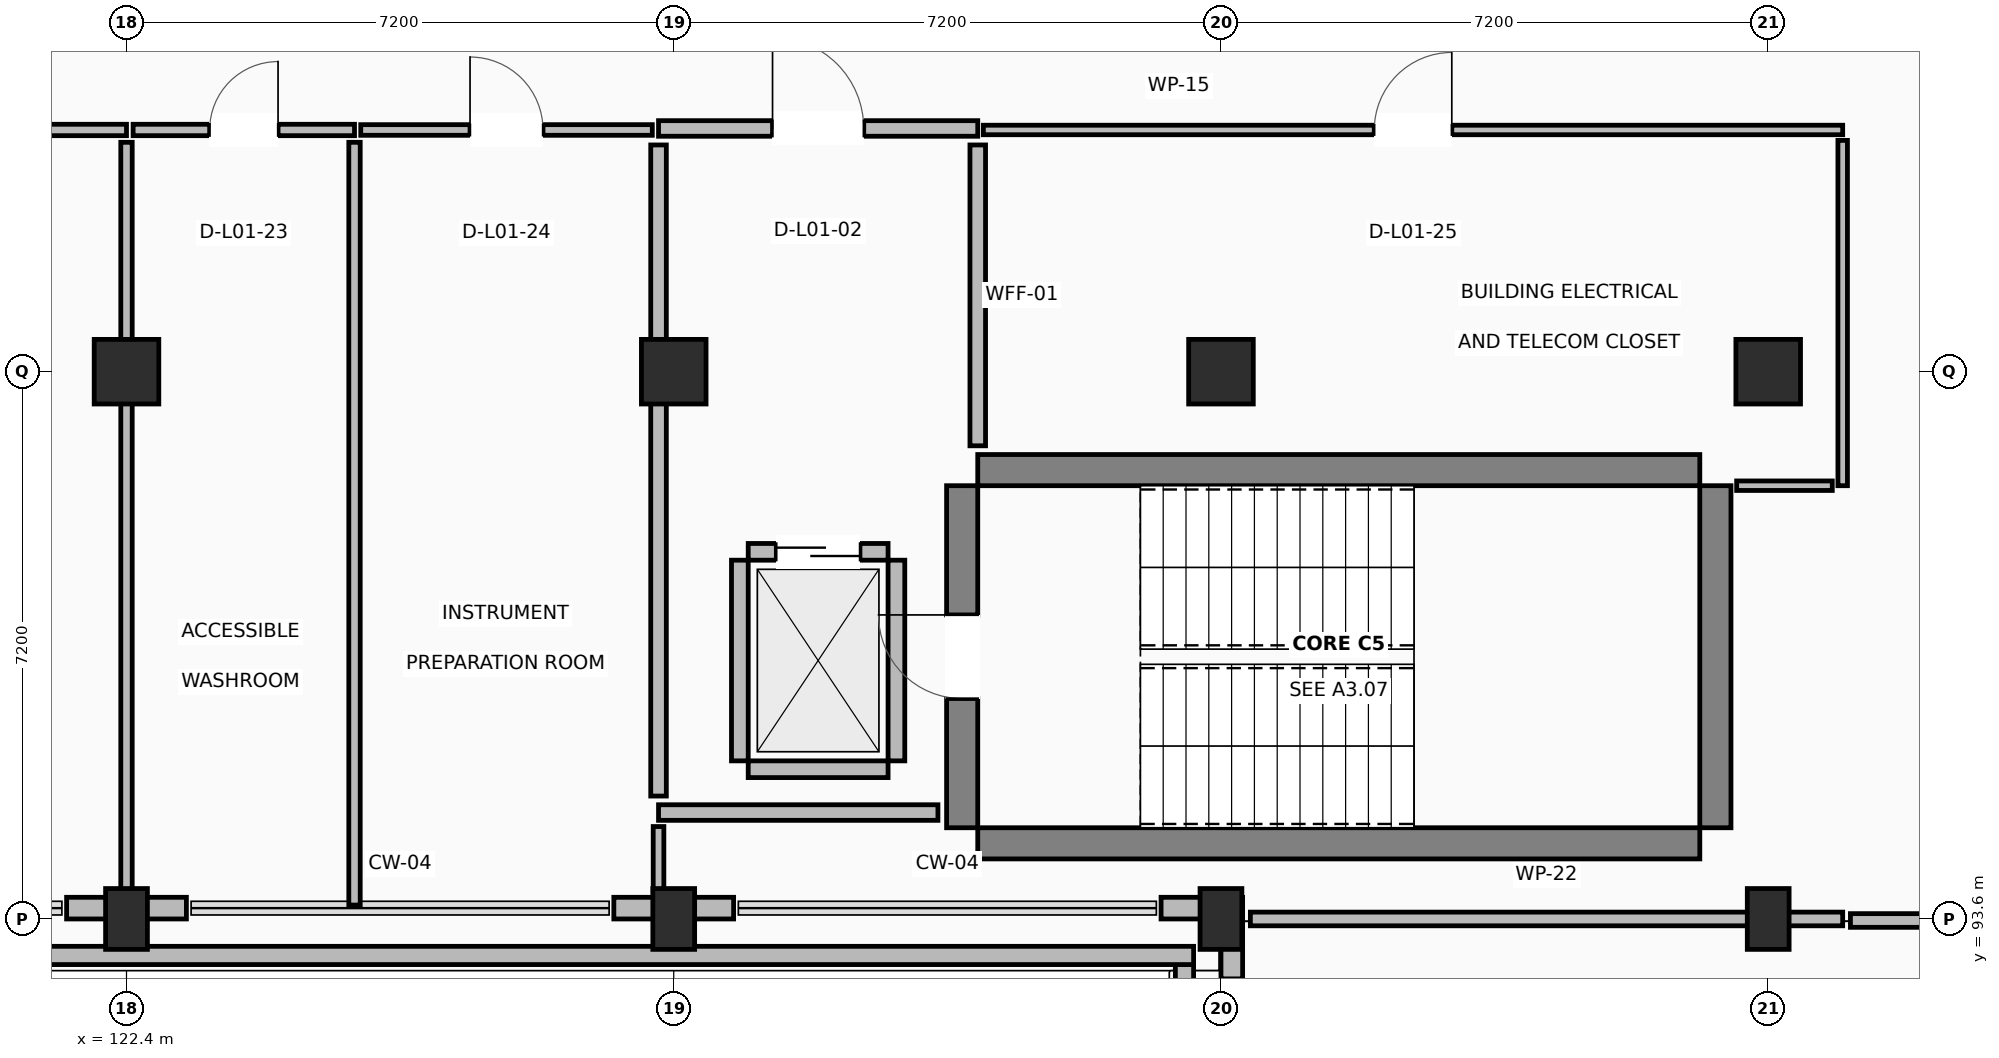
"""IFC4 building model, lengths in metres.
Left out: names, types, materials, properties, quantities, classifications, styles, units other than length and angle.
Written with IfcOpenShell. Run it as: python <this file> out.ifc"""

import sys

from ifc_helpers import new_model, si_unit, direction, frame, frame_2d, origin, origin_2d, place, context, subcontext, project, spatial, rectangle, extrude, element, fill, save


model = new_model("IFC4")
c1 = context("Model", 3, precision=1e-05, world=origin(), true_north=direction((0.0, 1.0)))
c2 = subcontext(c1, "Body", "Model", "MODEL_VIEW")
j1 = project(units=[si_unit("LENGTHUNIT", "METRE"), si_unit("PLANEANGLEUNIT", "RADIAN")], contexts=[c1])
p1 = place(None, origin())
s1 = spatial("IfcSite", under=j1, at=p1, CompositionType="ELEMENT")
p2 = place(p1, origin())
s2 = spatial("IfcBuilding", under=s1, at=p2, CompositionType="ELEMENT")
p3 = place(p2, frame((0.0, 0.0, 4.5)))
s3 = spatial("IfcBuildingStorey", under=s2, at=p3, CompositionType="ELEMENT", Elevation=4.5)
p4 = place(p3, frame((122.4, 93.6, 0.0), z_axis=(0.0, 0.0, 1.0), x_axis=(1.0, 0.0, 0.0)))
e1 = element("IfcColumn", 1, at=p4, inside=s3, PredefinedType="COLUMN", context=c2, shape_type="SweptSolid", body=[
    extrude(rectangle(XDim=0.55, YDim=0.8, at=origin_2d()), origin(), (0.0, 0.0, 1.0), 4.22),
])
p5 = place(p3, frame((122.4, 100.8, 0.0), z_axis=(0.0, 0.0, 1.0), x_axis=(1.0, 0.0, 0.0)))
e2 = element("IfcColumn", 2, at=p5, inside=s3, PredefinedType="COLUMN", context=c2, shape_type="SweptSolid", body=[
    extrude(rectangle(XDim=0.85, YDim=0.85, at=origin_2d()), origin(), (0.0, 0.0, 1.0), 4.22),
])
p6 = place(p3, frame((129.6, 93.6, 0.0), z_axis=(0.0, 0.0, 1.0), x_axis=(1.0, 0.0, 0.0)))
e3 = element("IfcColumn", 3, at=p6, inside=s3, PredefinedType="COLUMN", context=c2, shape_type="SweptSolid", body=[
    extrude(rectangle(XDim=0.55, YDim=0.8, at=origin_2d()), origin(), (0.0, 0.0, 1.0), 4.22),
])
p7 = place(p3, frame((129.6, 100.8, 0.0), z_axis=(0.0, 0.0, 1.0), x_axis=(1.0, 0.0, 0.0)))
e4 = element("IfcColumn", 4, at=p7, inside=s3, PredefinedType="COLUMN", context=c2, shape_type="SweptSolid", body=[
    extrude(rectangle(XDim=0.85, YDim=0.85, at=origin_2d()), origin(), (0.0, 0.0, 1.0), 4.22),
])
p8 = place(p3, frame((136.8, 93.6, 0.0), z_axis=(0.0, 0.0, 1.0), x_axis=(1.0, 0.0, 0.0)))
e5 = element("IfcColumn", 5, at=p8, inside=s3, PredefinedType="COLUMN", context=c2, shape_type="SweptSolid", body=[
    extrude(rectangle(XDim=0.55, YDim=0.8, at=origin_2d()), origin(), (0.0, 0.0, 1.0), 4.22),
])
p9 = place(p3, frame((136.8, 100.8, 0.0), z_axis=(0.0, 0.0, 1.0), x_axis=(1.0, 0.0, 0.0)))
e6 = element("IfcColumn", 6, at=p9, inside=s3, PredefinedType="COLUMN", context=c2, shape_type="SweptSolid", body=[
    extrude(rectangle(XDim=0.85, YDim=0.85, at=origin_2d()), origin(), (0.0, 0.0, 1.0), 4.22),
])
p10 = place(p3, frame((144.0, 93.6, 0.0), z_axis=(0.0, 0.0, 1.0), x_axis=(1.0, 0.0, 0.0)))
e7 = element("IfcColumn", 7, at=p10, inside=s3, PredefinedType="COLUMN", context=c2, shape_type="SweptSolid", body=[
    extrude(rectangle(XDim=0.55, YDim=0.8, at=origin_2d()), origin(), (0.0, 0.0, 1.0), 4.22),
])
p11 = place(p3, frame((144.0, 100.8, 0.0), z_axis=(0.0, 0.0, 1.0), x_axis=(1.0, 0.0, 0.0)))
e8 = element("IfcColumn", 8, at=p11, inside=s3, PredefinedType="COLUMN", context=c2, shape_type="SweptSolid", body=[
    extrude(rectangle(XDim=0.85, YDim=0.85, at=origin_2d()), origin(), (0.0, 0.0, 1.0), 4.22),
])
for number, where, z_axis, x_axis in (
    (9, (133.6, 94.595, 0.0), (0.0, 0.0, 1.0), (1.0, 0.0, 0.0)),
    (10, (133.6, 99.505, 0.0), (0.0, 0.0, 1.0), (1.0, 0.0, 0.0)),
):
    element("IfcWall", number, at=place(p3, frame(where, z_axis=z_axis, x_axis=x_axis)), inside=s3, PredefinedType="SHEAR", context=c2, shape_type="SweptSolid", body=[
        extrude(rectangle(XDim=9.5, YDim=0.41, at=frame_2d((4.75, 0.0))), origin(), (0.0, 0.0, 1.0), 4.22),
    ])
p12 = place(p3, frame((133.395, 94.8, 0.0), z_axis=(0.0, 0.0, 1.0), x_axis=(0.0, 1.0, 0.0)))
e11 = element("IfcWall", 11, at=p12, inside=s3, PredefinedType="SHEAR", context=c2, shape_type="SweptSolid", body=[
    extrude(rectangle(XDim=4.5, YDim=0.41, at=frame_2d((2.25, 0.0))), origin(), (0.0, 0.0, 1.0), 4.22),
])
p13 = place(p12, frame((1.7, 0.0, 0.0)))
e12 = element("IfcOpeningElement", 12, at=p13, cuts=e11, PredefinedType="OPENING", context=c2, shape_type="SweptSolid", body=[
    extrude(rectangle(XDim=1.1, YDim=2.15, at=frame_2d((0.55, 1.075))), frame((0.0, 0.215, 0.0), z_axis=(0.0, -1.0, 0.0), x_axis=(1.0, 0.0, 0.0)), (0.0, 0.0, 1.0), 0.43),
])
p14 = place(p3, frame((143.305, 94.8, 0.0), z_axis=(0.0, 0.0, 1.0), x_axis=(0.0, 1.0, 0.0)))
e13 = element("IfcWall", 13, at=p14, inside=s3, PredefinedType="SHEAR", context=c2, shape_type="SweptSolid", body=[
    extrude(rectangle(XDim=4.5, YDim=0.41, at=frame_2d((2.25, 0.0))), origin(), (0.0, 0.0, 1.0), 4.22),
])
for number, where, z_axis, x_axis in (
    (14, (121.612, 93.742, 0.0), (0.0, 0.0, 1.0), (1.0, 0.0, 0.0)),
    (15, (128.812, 93.742, 0.0), (0.0, 0.0, 1.0), (1.0, 0.0, 0.0)),
):
    element("IfcWall", number, at=place(p3, frame(where, z_axis=z_axis, x_axis=x_axis)), inside=s3, PredefinedType="STANDARD", context=c2, shape_type="SweptSolid", body=[
        extrude(rectangle(XDim=1.576, YDim=0.285, at=frame_2d((0.788, 0.0))), origin(), (0.0, 0.0, 1.0), 3.26),
    ])
p15 = place(p3, frame((136.012, 93.742, 0.0), z_axis=(0.0, 0.0, 1.0), x_axis=(1.0, 0.0, 0.0)))
e16 = element("IfcWall", 16, at=p15, inside=s3, PredefinedType="STANDARD", context=c2, shape_type="SweptSolid", body=[
    extrude(rectangle(XDim=0.788, YDim=0.285, at=frame_2d((0.394, 0.0))), origin(), (0.0, 0.0, 1.0), 3.26),
])
p16 = place(p3, frame((136.942, 93.885, 0.0), z_axis=(0.0, 0.0, 1.0), x_axis=(0.0, -1.0, 0.0)))
e17 = element("IfcWall", 17, at=p16, inside=s3, PredefinedType="STANDARD", context=c2, shape_type="SweptSolid", body=[
    extrude(rectangle(XDim=1.073, YDim=0.285, at=frame_2d((0.537, 0.0))), origin(), (0.0, 0.0, 1.0), 3.26),
])
p17 = place(p3, frame((136.32, 86.04, 0.0), z_axis=(0.0, 0.0, 1.0), x_axis=(0.0, 1.0, 0.0)))
e18 = element("IfcWall", 18, at=p17, inside=s3, PredefinedType="PARAPET", context=c2, shape_type="SweptSolid", body=[
    extrude(rectangle(XDim=6.96, YDim=0.24, at=frame_2d((3.48, 0.0))), origin(), (0.0, 0.0, 1.0), 1.12),
])
p18 = place(p3, frame((136.44, 93.12, 0.0), z_axis=(0.0, 0.0, 1.0), x_axis=(-1.0, 0.0, 0.0)))
e19 = element("IfcWall", 19, at=p18, inside=s3, PredefinedType="PARAPET", context=c2, shape_type="SweptSolid", body=[
    extrude(rectangle(XDim=57.84, YDim=0.24, at=frame_2d((28.92, 0.0))), origin(), (0.0, 0.0, 1.0), 1.12),
])
p19 = place(p3, frame((130.58, 95.57, 0.0), z_axis=(0.0, 0.0, 1.0), x_axis=(1.0, 0.0, 0.0)))
e20 = element("IfcWall", 20, at=p19, inside=s3, PredefinedType="STANDARD", context=c2, shape_type="SweptSolid", body=[
    extrude(rectangle(XDim=1.84, YDim=0.22, at=frame_2d((0.92, 0.0))), origin(), (0.0, 0.0, 1.0), 3.26),
])
p20 = place(p3, frame((130.58, 98.43, 0.0), z_axis=(0.0, 0.0, 1.0), x_axis=(1.0, 0.0, 0.0)))
e21 = element("IfcWall", 21, at=p20, inside=s3, PredefinedType="STANDARD", context=c2, shape_type="SweptSolid", body=[
    extrude(rectangle(XDim=1.84, YDim=0.22, at=frame_2d((0.92, 0.0))), origin(), (0.0, 0.0, 1.0), 3.26),
])
p21 = place(p20, frame((0.37, 0.0, 0.0)))
e22 = element("IfcOpeningElement", 22, at=p21, cuts=e21, PredefinedType="OPENING", context=c2, shape_type="SweptSolid", body=[
    extrude(rectangle(XDim=1.1, YDim=2.15, at=frame_2d((0.55, 1.075))), frame((0.0, 0.12, 0.0), z_axis=(0.0, -1.0, 0.0), x_axis=(1.0, 0.0, 0.0)), (0.0, 0.0, 1.0), 0.24),
])
for number, where, z_axis, x_axis in (
    (23, (130.47, 95.68, 0.0), (0.0, 0.0, 1.0), (0.0, 1.0, 0.0)),
    (24, (132.53, 95.68, 0.0), (0.0, 0.0, 1.0), (0.0, 1.0, 0.0)),
):
    element("IfcWall", number, at=place(p3, frame(where, z_axis=z_axis, x_axis=x_axis)), inside=s3, PredefinedType="STANDARD", context=c2, shape_type="SweptSolid", body=[
        extrude(rectangle(XDim=2.64, YDim=0.22, at=frame_2d((1.32, 0.0))), origin(), (0.0, 0.0, 1.0), 3.26),
    ])
p22 = place(p3, frame((129.4, 104.0, 0.0), z_axis=(0.0, 0.0, 1.0), x_axis=(1.0, 0.0, 0.0)))
e25 = element("IfcWall", 25, at=p22, inside=s3, PredefinedType="PARTITIONING", context=c2, shape_type="SweptSolid", body=[
    extrude(rectangle(XDim=4.2, YDim=0.205, at=frame_2d((2.1, 0.0))), origin(), (0.0, 0.0, 1.0), 3.26),
])
p23 = place(p22, frame((1.5, 0.0, 0.0)))
e26 = element("IfcOpeningElement", 26, at=p23, cuts=e25, PredefinedType="OPENING", context=c2, shape_type="SweptSolid", body=[
    extrude(rectangle(XDim=1.2, YDim=2.15, at=frame_2d((0.6, 1.075))), frame((0.0, 0.113, 0.0), z_axis=(0.0, -1.0, 0.0), x_axis=(1.0, 0.0, 0.0)), (0.0, 0.0, 1.0), 0.225),
])
p24 = place(p3, frame((133.6, 103.783, 0.0), z_axis=(0.0, 0.0, 1.0), x_axis=(0.0, -1.0, 0.0)))
e27 = element("IfcWall", 27, at=p24, inside=s3, PredefinedType="PARTITIONING", context=c2, shape_type="SweptSolid", body=[
    extrude(rectangle(XDim=3.958, YDim=0.205, at=frame_2d((1.979, 0.0))), origin(), (0.0, 0.0, 1.0), 3.26),
])
p25 = place(p3, frame((133.076, 95.0, 0.0), z_axis=(0.0, 0.0, 1.0), x_axis=(-1.0, 0.0, 0.0)))
e28 = element("IfcWall", 28, at=p25, inside=s3, PredefinedType="PARTITIONING", context=c2, shape_type="SweptSolid", body=[
    extrude(rectangle(XDim=3.676, YDim=0.205, at=frame_2d((1.838, 0.0))), origin(), (0.0, 0.0, 1.0), 3.26),
])
p26 = place(p3, frame((129.4, 95.217, 0.0), z_axis=(0.0, 0.0, 1.0), x_axis=(0.0, 1.0, 0.0)))
e29 = element("IfcWall", 29, at=p26, inside=s3, PredefinedType="PARTITIONING", context=c2, shape_type="SweptSolid", body=[
    extrude(rectangle(XDim=8.566, YDim=0.205, at=frame_2d((4.283, 0.0))), origin(), (0.0, 0.0, 1.0), 3.26),
])
p27 = place(p3, frame((137.187, 93.6, 0.0), z_axis=(0.0, 0.0, 1.0), x_axis=(1.0, 0.0, 0.0)))
e30 = element("IfcWall", 30, at=p27, inside=s3, PredefinedType="PARTITIONING", context=c2, shape_type="SweptSolid", body=[
    extrude(rectangle(XDim=7.793, YDim=0.18, at=frame_2d((3.896, 0.0))), origin(), (0.0, 0.0, 1.0), 3.26),
])
p28 = place(p3, frame((145.082, 93.58, 0.0), z_axis=(0.0, 0.0, 1.0), x_axis=(1.0, 0.0, 0.0)))
e31 = element("IfcWall", 31, at=p28, inside=s3, PredefinedType="PARTITIONING", context=c2, shape_type="SweptSolid", body=[
    extrude(rectangle(XDim=2.918, YDim=0.18, at=frame_2d((1.459, 0.0))), origin(), (0.0, 0.0, 1.0), 3.26),
])
p29 = place(p28, frame((0.934, 0.0, 0.0)))
e32 = element("IfcOpeningElement", 32, at=p29, cuts=e31, PredefinedType="OPENING", context=c2, shape_type="SweptSolid", body=[
    extrude(rectangle(XDim=1.05, YDim=2.15, at=frame_2d((0.525, 1.075))), frame((0.0, 0.1, 0.0), z_axis=(0.0, -1.0, 0.0), x_axis=(1.0, 0.0, 0.0)), (0.0, 0.0, 1.0), 0.2),
])
p30 = place(p3, frame((115.362, 103.98, 0.0), z_axis=(0.0, 0.0, 1.0), x_axis=(1.0, 0.0, 0.0)))
e33 = element("IfcWall", 33, at=p30, inside=s3, PredefinedType="PARTITIONING", context=c2, shape_type="SweptSolid", body=[
    extrude(rectangle(XDim=7.038, YDim=0.15, at=frame_2d((3.519, 0.0))), origin(), (0.0, 0.0, 1.0), 3.26),
])
p31 = place(p30, frame((3.079, 0.0, 0.0)))
e34 = element("IfcOpeningElement", 34, at=p31, cuts=e33, PredefinedType="OPENING", context=c2, shape_type="SweptSolid", body=[
    extrude(rectangle(XDim=0.88, YDim=2.1, at=frame_2d((0.44, 1.05))), frame((0.0, 0.085, 0.0), z_axis=(0.0, -1.0, 0.0), x_axis=(1.0, 0.0, 0.0)), (0.0, 0.0, 1.0), 0.17),
])
p32 = place(p3, frame((122.4, 103.818, 0.0), z_axis=(0.0, 0.0, 1.0), x_axis=(0.0, -1.0, 0.0)))
e35 = element("IfcWall", 35, at=p32, inside=s3, PredefinedType="PARTITIONING", context=c2, shape_type="SweptSolid", body=[
    extrude(rectangle(XDim=9.846, YDim=0.15, at=frame_2d((4.923, 0.0))), origin(), (0.0, 0.0, 1.0), 3.26),
])
p33 = place(p3, frame((122.487, 103.98, 0.0), z_axis=(0.0, 0.0, 1.0), x_axis=(1.0, 0.0, 0.0)))
e36 = element("IfcWall", 36, at=p33, inside=s3, PredefinedType="PARTITIONING", context=c2, shape_type="SweptSolid", body=[
    extrude(rectangle(XDim=2.913, YDim=0.15, at=frame_2d((1.457, 0.0))), origin(), (0.0, 0.0, 1.0), 3.26),
])
p34 = place(p33, frame((1.007, 0.0, 0.0)))
e37 = element("IfcOpeningElement", 37, at=p34, cuts=e36, PredefinedType="OPENING", context=c2, shape_type="SweptSolid", body=[
    extrude(rectangle(XDim=0.9, YDim=2.1, at=frame_2d((0.45, 1.05))), frame((0.0, 0.085, 0.0), z_axis=(0.0, -1.0, 0.0), x_axis=(1.0, 0.0, 0.0)), (0.0, 0.0, 1.0), 0.17),
])
p35 = place(p3, frame((125.4, 103.818, 0.0), z_axis=(0.0, 0.0, 1.0), x_axis=(0.0, -1.0, 0.0)))
e38 = element("IfcWall", 38, at=p35, inside=s3, PredefinedType="PARTITIONING", context=c2, shape_type="SweptSolid", body=[
    extrude(rectangle(XDim=10.035, YDim=0.15, at=frame_2d((5.018, 0.0))), origin(), (0.0, 0.0, 1.0), 3.26),
])
p36 = place(p3, frame((125.482, 103.98, 0.0), z_axis=(0.0, 0.0, 1.0), x_axis=(1.0, 0.0, 0.0)))
e39 = element("IfcWall", 39, at=p36, inside=s3, PredefinedType="PARTITIONING", context=c2, shape_type="SweptSolid", body=[
    extrude(rectangle(XDim=3.836, YDim=0.14, at=frame_2d((1.918, 0.0))), origin(), (0.0, 0.0, 1.0), 3.26),
])
p37 = place(p36, frame((1.438, 0.0, 0.0)))
e40 = element("IfcOpeningElement", 40, at=p37, cuts=e39, PredefinedType="OPENING", context=c2, shape_type="SweptSolid", body=[
    extrude(rectangle(XDim=0.96, YDim=2.1, at=frame_2d((0.48, 1.05))), frame((0.0, 0.08, 0.0), z_axis=(0.0, -1.0, 0.0), x_axis=(1.0, 0.0, 0.0)), (0.0, 0.0, 1.0), 0.16),
])
p38 = place(p3, frame((129.4, 94.816, 0.0), z_axis=(0.0, 0.0, 1.0), x_axis=(0.0, -1.0, 0.0)))
e41 = element("IfcWall", 41, at=p38, inside=s3, PredefinedType="PARTITIONING", context=c2, shape_type="SweptSolid", body=[
    extrude(rectangle(XDim=0.849, YDim=0.14, at=frame_2d((0.424, 0.0))), origin(), (0.0, 0.0, 1.0), 3.26),
])
p39 = place(p3, frame((133.674, 103.98, 0.0), z_axis=(0.0, 0.0, 1.0), x_axis=(1.0, 0.0, 0.0)))
e42 = element("IfcWall", 42, at=p39, inside=s3, PredefinedType="PARTITIONING", context=c2, shape_type="SweptSolid", body=[
    extrude(rectangle(XDim=11.306, YDim=0.125, at=frame_2d((5.653, 0.0))), origin(), (0.0, 0.0, 1.0), 3.26),
])
p40 = place(p39, frame((5.143, 0.0, 0.0)))
e43 = element("IfcOpeningElement", 43, at=p40, cuts=e42, PredefinedType="OPENING", context=c2, shape_type="SweptSolid", body=[
    extrude(rectangle(XDim=1.02, YDim=2.15, at=frame_2d((0.51, 1.075))), frame((0.0, 0.073, 0.0), z_axis=(0.0, -1.0, 0.0), x_axis=(1.0, 0.0, 0.0)), (0.0, 0.0, 1.0), 0.145),
])
p41 = place(p3, frame((144.98, 103.843, 0.0), z_axis=(0.0, 0.0, 1.0), x_axis=(0.0, -1.0, 0.0)))
e44 = element("IfcWall", 44, at=p41, inside=s3, PredefinedType="PARTITIONING", context=c2, shape_type="SweptSolid", body=[
    extrude(rectangle(XDim=4.543, YDim=0.125, at=frame_2d((2.271, 0.0))), origin(), (0.0, 0.0, 1.0), 3.26),
])
p42 = place(p3, frame((144.843, 99.3, 0.0), z_axis=(0.0, 0.0, 1.0), x_axis=(-1.0, 0.0, 0.0)))
e45 = element("IfcWall", 45, at=p42, inside=s3, PredefinedType="PARTITIONING", context=c2, shape_type="SweptSolid", body=[
    extrude(rectangle(XDim=1.258, YDim=0.125, at=frame_2d((0.629, 0.0))), origin(), (0.0, 0.0, 1.0), 3.26),
])
p43 = place(p13, origin())
e46 = element("IfcDoor", 46, at=p43, inside=s3, OperationType="SINGLE_SWING_RIGHT", PredefinedType="DOOR", context=c2, shape_type="SweptSolid", body=[
    extrude(rectangle(XDim=1.1, YDim=2.15, at=frame_2d((0.55, 1.075))), frame((0.0, 0.025, 0.0), z_axis=(0.0, -1.0, 0.0), x_axis=(1.0, 0.0, 0.0)), (0.0, 0.0, 1.0), 0.05),
])
fill(e12, e46)
p44 = place(p21, origin())
e47 = element("IfcDoor", 47, at=p44, inside=s3, OperationType="SLIDING_TO_RIGHT", PredefinedType="DOOR", context=c2, shape_type="SweptSolid", body=[
    extrude(rectangle(XDim=1.1, YDim=2.15, at=frame_2d((0.55, 1.075))), frame((0.0, 0.025, 0.0), z_axis=(0.0, -1.0, 0.0), x_axis=(1.0, 0.0, 0.0)), (0.0, 0.0, 1.0), 0.05),
])
fill(e22, e47)
p45 = place(p23, origin())
e48 = element("IfcDoor", 48, at=p45, inside=s3, OperationType="SINGLE_SWING_LEFT", PredefinedType="DOOR", context=c2, shape_type="SweptSolid", body=[
    extrude(rectangle(XDim=1.2, YDim=2.15, at=frame_2d((0.6, 1.075))), frame((0.0, 0.025, 0.0), z_axis=(0.0, -1.0, 0.0), x_axis=(1.0, 0.0, 0.0)), (0.0, 0.0, 1.0), 0.05),
])
fill(e26, e48)
p46 = place(p34, origin())
e49 = element("IfcDoor", 49, at=p46, inside=s3, OperationType="SINGLE_SWING_RIGHT", PredefinedType="DOOR", context=c2, shape_type="SweptSolid", body=[
    extrude(rectangle(XDim=0.9, YDim=2.1, at=frame_2d((0.45, 1.05))), frame((0.0, 0.025, 0.0), z_axis=(0.0, -1.0, 0.0), x_axis=(1.0, 0.0, 0.0)), (0.0, 0.0, 1.0), 0.05),
])
fill(e37, e49)
p47 = place(p37, origin())
e50 = element("IfcDoor", 50, at=p47, inside=s3, OperationType="SINGLE_SWING_LEFT", PredefinedType="DOOR", context=c2, shape_type="SweptSolid", body=[
    extrude(rectangle(XDim=0.96, YDim=2.1, at=frame_2d((0.48, 1.05))), frame((0.0, 0.025, 0.0), z_axis=(0.0, -1.0, 0.0), x_axis=(1.0, 0.0, 0.0)), (0.0, 0.0, 1.0), 0.05),
])
fill(e40, e50)
p48 = place(p40, origin())
e51 = element("IfcDoor", 51, at=p48, inside=s3, OperationType="SINGLE_SWING_RIGHT", PredefinedType="DOOR", context=c2, shape_type="SweptSolid", body=[
    extrude(rectangle(XDim=1.02, YDim=2.15, at=frame_2d((0.51, 1.075))), frame((0.0, 0.025, 0.0), z_axis=(0.0, -1.0, 0.0), x_axis=(1.0, 0.0, 0.0)), (0.0, 0.0, 1.0), 0.05),
])
fill(e43, e51)
save(model, sys.argv[1])
